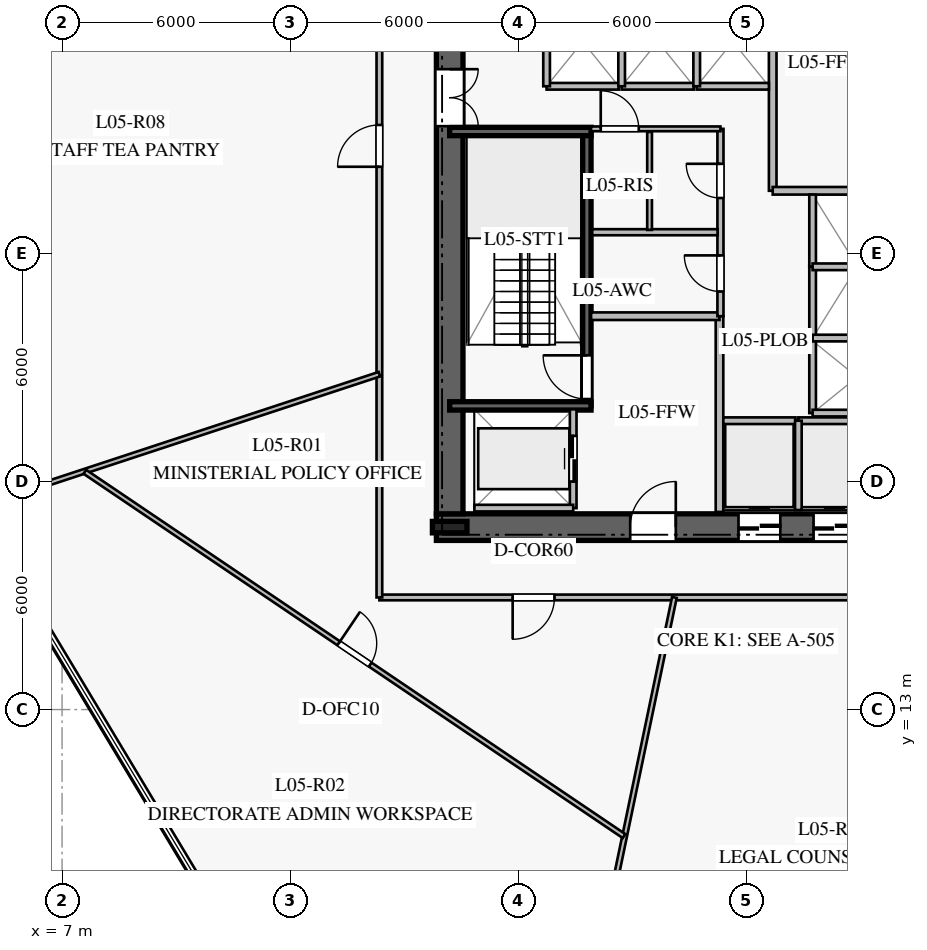
"""IFC4 building model, lengths in metres.
Left out: names, types, materials, properties, quantities, classifications, styles, units other than length and angle.
Written with IfcOpenShell. Run it as: python <this file> out.ifc"""

import sys

from ifc_helpers import new_model, si_unit, direction, frame, frame_2d, origin, origin_2d, place, context, subcontext, project, spatial, rectangle, i_section, extrude, element, fill, save


model = new_model("IFC4")
c1 = context("Model", 3, precision=1e-05, world=origin(), true_north=direction((0.0, 1.0)))
c2 = subcontext(c1, "Body", "Model", "MODEL_VIEW")
j1 = project(units=[si_unit("LENGTHUNIT", "METRE"), si_unit("PLANEANGLEUNIT", "RADIAN")], contexts=[c1])
p1 = place(None, origin())
s1 = spatial("IfcSite", under=j1, at=p1, CompositionType="ELEMENT")
p2 = place(p1, origin())
s2 = spatial("IfcBuilding", under=s1, at=p2, CompositionType="ELEMENT")
p3 = place(p2, frame((0.0, 0.0, 24.0)))
s3 = spatial("IfcBuildingStorey", under=s2, at=p3, CompositionType="ELEMENT", Elevation=24.0)
p4 = place(p3, frame((16.85, 17.8, 0.0), z_axis=(0.0, 0.0, 1.0), x_axis=(1.0, 0.0, 0.0)))
e1 = element("IfcWall", 1, at=p4, inside=s3, PredefinedType="SHEAR", context=c2, shape_type="SweptSolid", body=[
    extrude(rectangle(XDim=16.3, YDim=0.7, at=frame_2d((8.15, 0.0))), origin(), (0.0, 0.0, 1.0), 3.76),
])
p5 = place(p4, frame((5.1, 0.0, 0.0)))
e2 = element("IfcOpeningElement", 2, at=p5, cuts=e1, PredefinedType="OPENING", context=c2, shape_type="SweptSolid", body=[
    extrude(rectangle(XDim=1.2, YDim=2.25, at=frame_2d((0.6, 1.125))), frame((0.0, 0.36, 0.0), z_axis=(0.0, -1.0, 0.0), x_axis=(1.0, 0.0, 0.0)), (0.0, 0.0, 1.0), 0.72),
])
p6 = place(p4, frame((14.05, 0.0, 0.0)))
e3 = element("IfcOpeningElement", 3, at=p6, cuts=e1, PredefinedType="OPENING", context=c2, shape_type="SweptSolid", body=[
    extrude(rectangle(XDim=0.9, YDim=2.1, at=frame_2d((0.45, 1.05))), frame((0.0, 0.36, 0.0), z_axis=(0.0, -1.0, 0.0), x_axis=(1.0, 0.0, 0.0)), (0.0, 0.0, 1.0), 0.72),
])
p7 = place(p4, frame((7.95, 0.0, 0.0)))
e4 = element("IfcOpeningElement", 4, at=p7, cuts=e1, PredefinedType="OPENING", context=c2, shape_type="SweptSolid", body=[
    extrude(rectangle(XDim=1.1, YDim=2.2, at=frame_2d((0.55, 1.1))), frame((0.0, 0.36, 0.0), z_axis=(0.0, -1.0, 0.0), x_axis=(1.0, 0.0, 0.0)), (0.0, 0.0, 1.0), 0.72),
])
p8 = place(p4, frame((9.925, 0.0, 0.0)))
e5 = element("IfcOpeningElement", 5, at=p8, cuts=e1, PredefinedType="OPENING", context=c2, shape_type="SweptSolid", body=[
    extrude(rectangle(XDim=1.1, YDim=2.2, at=frame_2d((0.55, 1.1))), frame((0.0, 0.36, 0.0), z_axis=(0.0, -1.0, 0.0), x_axis=(1.0, 0.0, 0.0)), (0.0, 0.0, 1.0), 0.72),
])
p9 = place(p4, frame((11.9, 0.0, 0.0)))
e6 = element("IfcOpeningElement", 6, at=p9, cuts=e1, PredefinedType="OPENING", context=c2, shape_type="SweptSolid", body=[
    extrude(rectangle(XDim=1.1, YDim=2.2, at=frame_2d((0.55, 1.1))), frame((0.0, 0.36, 0.0), z_axis=(0.0, -1.0, 0.0), x_axis=(1.0, 0.0, 0.0)), (0.0, 0.0, 1.0), 0.72),
])
p10 = place(p3, frame((17.2, 31.85, 0.0), z_axis=(0.0, 0.0, 1.0), x_axis=(0.0, -1.0, 0.0)))
e7 = element("IfcWall", 7, at=p10, inside=s3, PredefinedType="SHEAR", context=c2, shape_type="SweptSolid", body=[
    extrude(rectangle(XDim=13.7, YDim=0.7, at=frame_2d((6.85, 0.0))), origin(), (0.0, 0.0, 1.0), 3.76),
])
p11 = place(p10, frame((2.0, 0.0, 0.0)))
e8 = element("IfcOpeningElement", 8, at=p11, cuts=e7, PredefinedType="OPENING", context=c2, shape_type="SweptSolid", body=[
    extrude(rectangle(XDim=1.5, YDim=2.2, at=frame_2d((0.75, 1.1))), frame((0.0, 0.36, 0.0), z_axis=(0.0, -1.0, 0.0), x_axis=(1.0, 0.0, 0.0)), (0.0, 0.0, 1.0), 0.72),
])
p12 = place(p3, frame((17.2, 17.8, 0.0), z_axis=(0.0, 0.0, 1.0), x_axis=(1.0, 0.0, 0.0)))
e9 = element("IfcColumn", 9, at=p12, inside=s3, PredefinedType="COLUMN", context=c2, shape_type="SweptSolid", body=[
    extrude(i_section(OverallWidth=0.302, OverallDepth=0.91, WebThickness=0.021, FlangeThickness=0.04, at=origin_2d()), origin(), (0.0, 0.0, 1.0), 4.0),
])
p13 = place(p3, frame((20.81, 20.99, 0.0), z_axis=(0.0, 0.0, 1.0), x_axis=(0.0, 1.0, 0.0)))
e10 = element("IfcWall", 10, at=p13, inside=s3, PredefinedType="SOLIDWALL", context=c2, shape_type="SweptSolid", body=[
    extrude(rectangle(XDim=7.22, YDim=0.22, at=frame_2d((3.61, 0.0))), origin(), (0.0, 0.0, 1.0), 3.76),
])
p14 = place(p13, frame((0.18, 0.0, 0.0)))
e11 = element("IfcOpeningElement", 11, at=p14, cuts=e10, PredefinedType="OPENING", context=c2, shape_type="SweptSolid", body=[
    extrude(rectangle(XDim=1.15, YDim=2.2, at=frame_2d((0.575, 1.1))), frame((0.0, 0.12, 0.0), z_axis=(0.0, -1.0, 0.0), x_axis=(1.0, 0.0, 0.0)), (0.0, 0.0, 1.0), 0.24),
])
for number, where, z_axis, x_axis in (
    (12, (17.2, 20.99, 0.0), (0.0, 0.0, 1.0), (1.0, 0.0, 0.0)),
    (13, (17.2, 28.21, 0.0), (0.0, 0.0, 1.0), (1.0, 0.0, 0.0)),
):
    element("IfcWall", number, at=place(p3, frame(where, z_axis=z_axis, x_axis=x_axis)), inside=s3, PredefinedType="SOLIDWALL", context=c2, shape_type="SweptSolid", body=[
        extrude(rectangle(XDim=3.72, YDim=0.22, at=frame_2d((1.86, 0.0))), origin(), (0.0, 0.0, 1.0), 3.76),
    ])
p15 = place(p3, frame((24.3, 18.2, 0.0), z_axis=(0.0, 0.0, 1.0), x_axis=(0.0, 1.0, 0.0)))
e14 = element("IfcWall", 14, at=p15, inside=s3, PredefinedType="PARTITIONING", context=c2, shape_type="SweptSolid", body=[
    extrude(rectangle(XDim=5.15, YDim=0.2, at=frame_2d((2.575, 0.0))), origin(), (0.0, 0.0, 1.0), 3.76),
])
p16 = place(p3, frame((20.92, 23.35, 0.0), z_axis=(0.0, 0.0, 1.0), x_axis=(1.0, 0.0, 0.0)))
e15 = element("IfcWall", 15, at=p16, inside=s3, PredefinedType="PARTITIONING", context=c2, shape_type="SweptSolid", body=[
    extrude(rectangle(XDim=3.38, YDim=0.2, at=frame_2d((1.69, 0.0))), origin(), (0.0, 0.0, 1.0), 3.76),
])
p17 = place(p3, frame((25.7, 26.65, 0.0), z_axis=(0.0, 0.0, 1.0), x_axis=(0.0, 1.0, 0.0)))
e16 = element("IfcWall", 16, at=p17, inside=s3, PredefinedType="PARTITIONING", context=c2, shape_type="SweptSolid", body=[
    extrude(rectangle(XDim=5.15, YDim=0.2, at=frame_2d((2.575, 0.0))), origin(), (0.0, 0.0, 1.0), 3.76),
])
p18 = place(p3, frame((25.7, 26.65, 0.0), z_axis=(0.0, 0.0, 1.0), x_axis=(1.0, 0.0, 0.0)))
e17 = element("IfcWall", 17, at=p18, inside=s3, PredefinedType="PARTITIONING", context=c2, shape_type="SweptSolid", body=[
    extrude(rectangle(XDim=3.38, YDim=0.2, at=frame_2d((1.69, 0.0))), origin(), (0.0, 0.0, 1.0), 3.76),
])
p19 = place(p3, frame((24.325, 23.35, 0.0), z_axis=(0.0, 0.0, 1.0), x_axis=(0.0, 1.0, 0.0)))
e18 = element("IfcWall", 18, at=p19, inside=s3, PredefinedType="PLUMBINGWALL", context=c2, shape_type="SweptSolid", body=[
    extrude(rectangle(XDim=4.93, YDim=0.16, at=frame_2d((2.465, 0.0))), origin(), (0.0, 0.0, 1.0), 3.76),
])
p20 = place(p19, frame((0.65, 0.0, 0.0)))
e19 = element("IfcOpeningElement", 19, at=p20, cuts=e18, PredefinedType="OPENING", context=c2, shape_type="SweptSolid", body=[
    extrude(rectangle(XDim=0.95, YDim=2.1, at=frame_2d((0.475, 1.05))), frame((0.0, 0.09, 0.0), z_axis=(0.0, -1.0, 0.0), x_axis=(1.0, 0.0, 0.0)), (0.0, 0.0, 1.0), 0.18),
])
p21 = place(p19, frame((3.11, 0.0, 0.0)))
e20 = element("IfcOpeningElement", 20, at=p21, cuts=e18, PredefinedType="OPENING", context=c2, shape_type="SweptSolid", body=[
    extrude(rectangle(XDim=0.9, YDim=2.1, at=frame_2d((0.45, 1.05))), frame((0.0, 0.09, 0.0), z_axis=(0.0, -1.0, 0.0), x_axis=(1.0, 0.0, 0.0)), (0.0, 0.0, 1.0), 0.18),
])
p22 = place(p3, frame((20.92, 28.28, 0.0), z_axis=(0.0, 0.0, 1.0), x_axis=(1.0, 0.0, 0.0)))
e21 = element("IfcWall", 21, at=p22, inside=s3, PredefinedType="PARTITIONING", context=c2, shape_type="SweptSolid", body=[
    extrude(rectangle(XDim=3.405, YDim=0.125, at=frame_2d((1.703, 0.0))), origin(), (0.0, 0.0, 1.0), 3.76),
])
p23 = place(p22, frame((0.255, 0.0, 0.0)))
e22 = element("IfcOpeningElement", 22, at=p23, cuts=e21, PredefinedType="OPENING", context=c2, shape_type="SweptSolid", body=[
    extrude(rectangle(XDim=1.0, YDim=2.15, at=frame_2d((0.5, 1.075))), frame((0.0, 0.073, 0.0), z_axis=(0.0, -1.0, 0.0), x_axis=(1.0, 0.0, 0.0)), (0.0, 0.0, 1.0), 0.145),
])
p24 = place(p3, frame((20.95, 25.56, 0.0), z_axis=(0.0, 0.0, 1.0), x_axis=(1.0, 0.0, 0.0)))
e23 = element("IfcWall", 23, at=p24, inside=s3, PredefinedType="PLUMBINGWALL", context=c2, shape_type="SweptSolid", body=[
    extrude(rectangle(XDim=3.3, YDim=0.16, at=frame_2d((1.65, 0.0))), origin(), (0.0, 0.0, 1.0), 3.76),
])
p25 = place(p3, frame((22.46, 25.62, 0.0), z_axis=(0.0, 0.0, 1.0), x_axis=(0.0, 1.0, 0.0)))
e24 = element("IfcWall", 24, at=p25, inside=s3, PredefinedType="PARTITIONING", context=c2, shape_type="SweptSolid", body=[
    extrude(rectangle(XDim=2.58, YDim=0.125, at=frame_2d((1.29, 0.0))), origin(), (0.0, 0.0, 1.0), 3.76),
])
p26 = place(p3, frame((24.4, 20.6, 0.0), z_axis=(0.0, 0.0, 1.0), x_axis=(1.0, 0.0, 0.0)))
e25 = element("IfcWall", 25, at=p26, inside=s3, PredefinedType="PARTITIONING", context=c2, shape_type="SweptSolid", body=[
    extrude(rectangle(XDim=1.9, YDim=0.175, at=frame_2d((0.95, 0.0))), origin(), (0.0, 0.0, 1.0), 3.76),
])
p27 = place(p3, frame((26.375, 20.6, 0.0), z_axis=(0.0, 0.0, 1.0), x_axis=(1.0, 0.0, 0.0)))
e26 = element("IfcWall", 26, at=p27, inside=s3, PredefinedType="PARTITIONING", context=c2, shape_type="SweptSolid", body=[
    extrude(rectangle(XDim=1.9, YDim=0.175, at=frame_2d((0.95, 0.0))), origin(), (0.0, 0.0, 1.0), 3.76),
])
p28 = place(p3, frame((26.375, 18.25, 0.0), z_axis=(0.0, 0.0, 1.0), x_axis=(0.0, 1.0, 0.0)))
e27 = element("IfcWall", 27, at=p28, inside=s3, PredefinedType="PARTITIONING", context=c2, shape_type="SweptSolid", body=[
    extrude(rectangle(XDim=2.35, YDim=0.175, at=frame_2d((1.175, 0.0))), origin(), (0.0, 0.0, 1.0), 3.76),
])
p29 = place(p3, frame((19.75, 29.4, 0.0), z_axis=(0.0, 0.0, 1.0), x_axis=(1.0, 0.0, 0.0)))
e28 = element("IfcWall", 28, at=p29, inside=s3, PredefinedType="PARTITIONING", context=c2, shape_type="SweptSolid", body=[
    extrude(rectangle(XDim=1.9, YDim=0.175, at=frame_2d((0.95, 0.0))), origin(), (0.0, 0.0, 1.0), 3.76),
])
p30 = place(p3, frame((19.75, 29.4, 0.0), z_axis=(0.0, 0.0, 1.0), x_axis=(0.0, 1.0, 0.0)))
e29 = element("IfcWall", 29, at=p30, inside=s3, PredefinedType="PARTITIONING", context=c2, shape_type="SweptSolid", body=[
    extrude(rectangle(XDim=2.35, YDim=0.175, at=frame_2d((1.175, 0.0))), origin(), (0.0, 0.0, 1.0), 3.76),
])
p31 = place(p3, frame((21.725, 29.4, 0.0), z_axis=(0.0, 0.0, 1.0), x_axis=(1.0, 0.0, 0.0)))
e30 = element("IfcWall", 30, at=p31, inside=s3, PredefinedType="PARTITIONING", context=c2, shape_type="SweptSolid", body=[
    extrude(rectangle(XDim=1.9, YDim=0.175, at=frame_2d((0.95, 0.0))), origin(), (0.0, 0.0, 1.0), 3.76),
])
p32 = place(p3, frame((21.725, 29.4, 0.0), z_axis=(0.0, 0.0, 1.0), x_axis=(0.0, 1.0, 0.0)))
e31 = element("IfcWall", 31, at=p32, inside=s3, PredefinedType="PARTITIONING", context=c2, shape_type="SweptSolid", body=[
    extrude(rectangle(XDim=2.35, YDim=0.175, at=frame_2d((1.175, 0.0))), origin(), (0.0, 0.0, 1.0), 3.76),
])
p33 = place(p3, frame((23.7, 29.4, 0.0), z_axis=(0.0, 0.0, 1.0), x_axis=(1.0, 0.0, 0.0)))
e32 = element("IfcWall", 32, at=p33, inside=s3, PredefinedType="PARTITIONING", context=c2, shape_type="SweptSolid", body=[
    extrude(rectangle(XDim=1.9, YDim=0.175, at=frame_2d((0.95, 0.0))), origin(), (0.0, 0.0, 1.0), 3.76),
])
p34 = place(p3, frame((23.7, 29.4, 0.0), z_axis=(0.0, 0.0, 1.0), x_axis=(0.0, 1.0, 0.0)))
e33 = element("IfcWall", 33, at=p34, inside=s3, PredefinedType="PARTITIONING", context=c2, shape_type="SweptSolid", body=[
    extrude(rectangle(XDim=2.35, YDim=0.175, at=frame_2d((1.175, 0.0))), origin(), (0.0, 0.0, 1.0), 3.76),
])
p35 = place(p3, frame((26.75, 20.8, 0.0), z_axis=(0.0, 0.0, 1.0), x_axis=(0.0, 1.0, 0.0)))
e34 = element("IfcWall", 34, at=p35, inside=s3, PredefinedType="PARTITIONING", context=c2, shape_type="SweptSolid", body=[
    extrude(rectangle(XDim=1.9, YDim=0.175, at=frame_2d((0.95, 0.0))), origin(), (0.0, 0.0, 1.0), 3.76),
])
p36 = place(p3, frame((26.75, 20.8, 0.0), z_axis=(0.0, 0.0, 1.0), x_axis=(1.0, 0.0, 0.0)))
e35 = element("IfcWall", 35, at=p36, inside=s3, PredefinedType="PARTITIONING", context=c2, shape_type="SweptSolid", body=[
    extrude(rectangle(XDim=2.35, YDim=0.175, at=frame_2d((1.175, 0.0))), origin(), (0.0, 0.0, 1.0), 3.76),
])
p37 = place(p3, frame((26.75, 22.775, 0.0), z_axis=(0.0, 0.0, 1.0), x_axis=(0.0, 1.0, 0.0)))
e36 = element("IfcWall", 36, at=p37, inside=s3, PredefinedType="PARTITIONING", context=c2, shape_type="SweptSolid", body=[
    extrude(rectangle(XDim=1.9, YDim=0.175, at=frame_2d((0.95, 0.0))), origin(), (0.0, 0.0, 1.0), 3.76),
])
p38 = place(p3, frame((26.75, 22.775, 0.0), z_axis=(0.0, 0.0, 1.0), x_axis=(1.0, 0.0, 0.0)))
e37 = element("IfcWall", 37, at=p38, inside=s3, PredefinedType="PARTITIONING", context=c2, shape_type="SweptSolid", body=[
    extrude(rectangle(XDim=2.35, YDim=0.175, at=frame_2d((1.175, 0.0))), origin(), (0.0, 0.0, 1.0), 3.76),
])
p39 = place(p3, frame((26.75, 24.65, 0.0), z_axis=(0.0, 0.0, 1.0), x_axis=(0.0, 1.0, 0.0)))
e38 = element("IfcWall", 38, at=p39, inside=s3, PredefinedType="PARTITIONING", context=c2, shape_type="SweptSolid", body=[
    extrude(rectangle(XDim=1.9, YDim=0.175, at=frame_2d((0.95, 0.0))), origin(), (0.0, 0.0, 1.0), 3.76),
])
p40 = place(p3, frame((26.75, 24.65, 0.0), z_axis=(0.0, 0.0, 1.0), x_axis=(1.0, 0.0, 0.0)))
e39 = element("IfcWall", 39, at=p40, inside=s3, PredefinedType="PARTITIONING", context=c2, shape_type="SweptSolid", body=[
    extrude(rectangle(XDim=2.35, YDim=0.175, at=frame_2d((1.175, 0.0))), origin(), (0.0, 0.0, 1.0), 3.76),
])
p41 = place(p3, frame((20.45, 18.3, 0.0), z_axis=(0.0, 0.0, 1.0), x_axis=(0.0, 1.0, 0.0)))
e40 = element("IfcWall", 40, at=p41, inside=s3, PredefinedType="PARTITIONING", context=c2, shape_type="SweptSolid", body=[
    extrude(rectangle(XDim=2.6, YDim=0.175, at=frame_2d((1.3, 0.0))), origin(), (0.0, 0.0, 1.0), 3.76),
])
p42 = place(p41, frame((0.7, 0.0, 0.0)))
e41 = element("IfcOpeningElement", 41, at=p42, cuts=e40, PredefinedType="OPENING", context=c2, shape_type="SweptSolid", body=[
    extrude(rectangle(XDim=1.2, YDim=2.2, at=frame_2d((0.6, 1.1))), frame((0.0, 0.098, 0.0), z_axis=(0.0, -1.0, 0.0), x_axis=(1.0, 0.0, 0.0)), (0.0, 0.0, 1.0), 0.195),
])
p43 = place(p3, frame((17.85, 18.3, 0.0), z_axis=(0.0, 0.0, 1.0), x_axis=(1.0, 0.0, 0.0)))
e42 = element("IfcWall", 42, at=p43, inside=s3, PredefinedType="PARTITIONING", context=c2, shape_type="SweptSolid", body=[
    extrude(rectangle(XDim=2.6, YDim=0.175, at=frame_2d((1.3, 0.0))), origin(), (0.0, 0.0, 1.0), 3.76),
])
p44 = place(p3, frame((34.65, 15.95, 0.0), z_axis=(0.0, 0.0, 1.0), x_axis=(-1.0, 0.0, 0.0)))
e43 = element("IfcWall", 43, at=p44, inside=s3, PredefinedType="PARTITIONING", context=c2, shape_type="SweptSolid", body=[
    extrude(rectangle(XDim=19.3, YDim=0.15, at=frame_2d((9.65, 0.0))), origin(), (0.0, 0.0, 1.0), 3.21),
])
p45 = place(p44, frame((14.693, 0.0, 0.0)))
e44 = element("IfcOpeningElement", 44, at=p45, cuts=e43, PredefinedType="OPENING", context=c2, shape_type="SweptSolid", body=[
    extrude(rectangle(XDim=1.1, YDim=2.2, at=frame_2d((0.55, 1.1))), frame((0.0, 0.085, 0.0), z_axis=(0.0, -1.0, 0.0), x_axis=(1.0, 0.0, 0.0)), (0.0, 0.0, 1.0), 0.17),
])
p46 = place(p44, frame((5.319, 0.0, 0.0)))
e45 = element("IfcOpeningElement", 45, at=p46, cuts=e43, PredefinedType="OPENING", context=c2, shape_type="SweptSolid", body=[
    extrude(rectangle(XDim=1.1, YDim=2.2, at=frame_2d((0.55, 1.1))), frame((0.0, 0.085, 0.0), z_axis=(0.0, -1.0, 0.0), x_axis=(1.0, 0.0, 0.0)), (0.0, 0.0, 1.0), 0.17),
])
p47 = place(p3, frame((15.35, 15.95, 0.0), z_axis=(0.0, 0.0, 1.0), x_axis=(0.0, 1.0, 0.0)))
e46 = element("IfcWall", 46, at=p47, inside=s3, PredefinedType="PARTITIONING", context=c2, shape_type="SweptSolid", body=[
    extrude(rectangle(XDim=18.1, YDim=0.15, at=frame_2d((9.05, 0.0))), origin(), (0.0, 0.0, 1.0), 3.21),
])
p48 = place(p47, frame((11.332, 0.0, 0.0)))
e47 = element("IfcOpeningElement", 47, at=p48, cuts=e46, PredefinedType="OPENING", context=c2, shape_type="SweptSolid", body=[
    extrude(rectangle(XDim=1.1, YDim=2.2, at=frame_2d((0.55, 1.1))), frame((0.0, 0.085, 0.0), z_axis=(0.0, -1.0, 0.0), x_axis=(1.0, 0.0, 0.0)), (0.0, 0.0, 1.0), 0.17),
])
p49 = place(p3, frame((15.35, 21.824, 0.0), z_axis=(0.0, 0.0, 1.0), x_axis=(-0.949851770283, -0.312700518851, 0.0)))
e48 = element("IfcWall", 48, at=p49, inside=s3, PredefinedType="PARTITIONING", context=c2, shape_type="SweptSolid", body=[
    extrude(rectangle(XDim=10.451, YDim=0.125, at=frame_2d((5.226, 0.0))), origin(), (0.0, 0.0, 1.0), 3.21),
])
p50 = place(p3, frame((23.113, 15.95, 0.0), z_axis=(0.0, 0.0, 1.0), x_axis=(-0.204117775604, -0.97894633851, 0.0)))
e49 = element("IfcWall", 49, at=p50, inside=s3, PredefinedType="PARTITIONING", context=c2, shape_type="SweptSolid", body=[
    extrude(rectangle(XDim=11.268, YDim=0.125, at=frame_2d((5.634, 0.0))), origin(), (0.0, 0.0, 1.0), 3.76),
])
p51 = place(p3, frame((7.599, 19.256, 0.0), z_axis=(0.0, 0.0, 1.0), x_axis=(0.828641341799, -0.559779891262, 0.0)))
e50 = element("IfcWall", 50, at=p51, inside=s3, PredefinedType="PARTITIONING", context=c2, shape_type="SweptSolid", body=[
    extrude(rectangle(XDim=17.123, YDim=0.125, at=frame_2d((8.562, 0.0))), origin(), (0.0, 0.0, 1.0), 3.21),
])
p52 = place(p51, frame((8.062, 0.0, 0.0)))
e51 = element("IfcOpeningElement", 51, at=p52, cuts=e50, PredefinedType="OPENING", context=c2, shape_type="SweptSolid", body=[
    extrude(rectangle(XDim=1.0, YDim=2.15, at=frame_2d((0.5, 1.075))), frame((0.0, 0.073, 0.0), z_axis=(0.0, -1.0, 0.0), x_axis=(1.0, 0.0, 0.0)), (0.0, 0.0, 1.0), 0.145),
])
p53 = place(p14, origin())
e52 = element("IfcDoor", 52, at=p53, inside=s3, OperationType="SINGLE_SWING_RIGHT", PredefinedType="DOOR", context=c2, shape_type="SweptSolid", body=[
    extrude(rectangle(XDim=1.15, YDim=2.2, at=frame_2d((0.575, 1.1))), frame((0.0, 0.025, 0.0), z_axis=(0.0, -1.0, 0.0), x_axis=(1.0, 0.0, 0.0)), (0.0, 0.0, 1.0), 0.05),
])
fill(e11, e52)
p54 = place(p5, origin())
e53 = element("IfcDoor", 53, at=p54, inside=s3, OperationType="SINGLE_SWING_RIGHT", PredefinedType="DOOR", context=c2, shape_type="SweptSolid", body=[
    extrude(rectangle(XDim=1.2, YDim=2.25, at=frame_2d((0.6, 1.125))), frame((0.0, 0.025, 0.0), z_axis=(0.0, -1.0, 0.0), x_axis=(1.0, 0.0, 0.0)), (0.0, 0.0, 1.0), 0.05),
])
fill(e2, e53)
p55 = place(p11, origin())
e54 = element("IfcDoor", 54, at=p55, inside=s3, OperationType="DOUBLE_DOOR_SINGLE_SWING", PredefinedType="DOOR", context=c2, shape_type="SweptSolid", body=[
    extrude(rectangle(XDim=1.5, YDim=2.2, at=frame_2d((0.75, 1.1))), frame((0.0, 0.025, 0.0), z_axis=(0.0, -1.0, 0.0), x_axis=(1.0, 0.0, 0.0)), (0.0, 0.0, 1.0), 0.05),
])
fill(e8, e54)
p56 = place(p20, origin())
e55 = element("IfcDoor", 55, at=p56, inside=s3, OperationType="SINGLE_SWING_RIGHT", PredefinedType="DOOR", context=c2, shape_type="SweptSolid", body=[
    extrude(rectangle(XDim=0.95, YDim=2.1, at=frame_2d((0.475, 1.05))), frame((0.0, 0.025, 0.0), z_axis=(0.0, -1.0, 0.0), x_axis=(1.0, 0.0, 0.0)), (0.0, 0.0, 1.0), 0.05),
])
fill(e19, e55)
p57 = place(p23, origin())
e56 = element("IfcDoor", 56, at=p57, inside=s3, OperationType="SINGLE_SWING_LEFT", PredefinedType="DOOR", context=c2, shape_type="SweptSolid", body=[
    extrude(rectangle(XDim=1.0, YDim=2.15, at=frame_2d((0.5, 1.075))), frame((0.0, 0.025, 0.0), z_axis=(0.0, -1.0, 0.0), x_axis=(1.0, 0.0, 0.0)), (0.0, 0.0, 1.0), 0.05),
])
fill(e22, e56)
p58 = place(p21, origin())
e57 = element("IfcDoor", 57, at=p58, inside=s3, OperationType="SINGLE_SWING_RIGHT", PredefinedType="DOOR", context=c2, shape_type="SweptSolid", body=[
    extrude(rectangle(XDim=0.9, YDim=2.1, at=frame_2d((0.45, 1.05))), frame((0.0, 0.025, 0.0), z_axis=(0.0, -1.0, 0.0), x_axis=(1.0, 0.0, 0.0)), (0.0, 0.0, 1.0), 0.05),
])
fill(e20, e57)
p59 = place(p7, origin())
e58 = element("IfcDoor", 58, at=p59, inside=s3, OperationType="DOUBLE_DOOR_SLIDING", PredefinedType="DOOR", context=c2, shape_type="SweptSolid", body=[
    extrude(rectangle(XDim=1.1, YDim=2.2, at=frame_2d((0.55, 1.1))), frame((0.0, 0.025, 0.0), z_axis=(0.0, -1.0, 0.0), x_axis=(1.0, 0.0, 0.0)), (0.0, 0.0, 1.0), 0.05),
])
fill(e4, e58)
p60 = place(p8, origin())
e59 = element("IfcDoor", 59, at=p60, inside=s3, OperationType="DOUBLE_DOOR_SLIDING", PredefinedType="DOOR", context=c2, shape_type="SweptSolid", body=[
    extrude(rectangle(XDim=1.1, YDim=2.2, at=frame_2d((0.55, 1.1))), frame((0.0, 0.025, 0.0), z_axis=(0.0, -1.0, 0.0), x_axis=(1.0, 0.0, 0.0)), (0.0, 0.0, 1.0), 0.05),
])
fill(e5, e59)
p61 = place(p42, origin())
e60 = element("IfcDoor", 60, at=p61, inside=s3, OperationType="DOUBLE_DOOR_SLIDING", PredefinedType="DOOR", context=c2, shape_type="SweptSolid", body=[
    extrude(rectangle(XDim=1.2, YDim=2.2, at=frame_2d((0.6, 1.1))), frame((0.0, 0.025, 0.0), z_axis=(0.0, -1.0, 0.0), x_axis=(1.0, 0.0, 0.0)), (0.0, 0.0, 1.0), 0.05),
])
fill(e41, e60)
p62 = place(p45, origin())
e61 = element("IfcDoor", 61, at=p62, inside=s3, OperationType="SINGLE_SWING_RIGHT", PredefinedType="DOOR", context=c2, shape_type="SweptSolid", body=[
    extrude(rectangle(XDim=1.1, YDim=2.2, at=frame_2d((0.55, 1.1))), frame((0.0, 0.025, 0.0), z_axis=(0.0, -1.0, 0.0), x_axis=(1.0, 0.0, 0.0)), (0.0, 0.0, 1.0), 0.05),
])
fill(e44, e61)
p63 = place(p52, origin())
e62 = element("IfcDoor", 62, at=p63, inside=s3, OperationType="SINGLE_SWING_LEFT", PredefinedType="DOOR", context=c2, shape_type="SweptSolid", body=[
    extrude(rectangle(XDim=1.0, YDim=2.15, at=frame_2d((0.5, 1.075))), frame((0.0, 0.025, 0.0), z_axis=(0.0, -1.0, 0.0), x_axis=(1.0, 0.0, 0.0)), (0.0, 0.0, 1.0), 0.05),
])
fill(e51, e62)
p64 = place(p48, origin())
e63 = element("IfcDoor", 63, at=p64, inside=s3, OperationType="SINGLE_SWING_LEFT", PredefinedType="DOOR", context=c2, shape_type="SweptSolid", body=[
    extrude(rectangle(XDim=1.1, YDim=2.2, at=frame_2d((0.55, 1.1))), frame((0.0, 0.025, 0.0), z_axis=(0.0, -1.0, 0.0), x_axis=(1.0, 0.0, 0.0)), (0.0, 0.0, 1.0), 0.05),
])
fill(e47, e63)
save(model, sys.argv[1])
